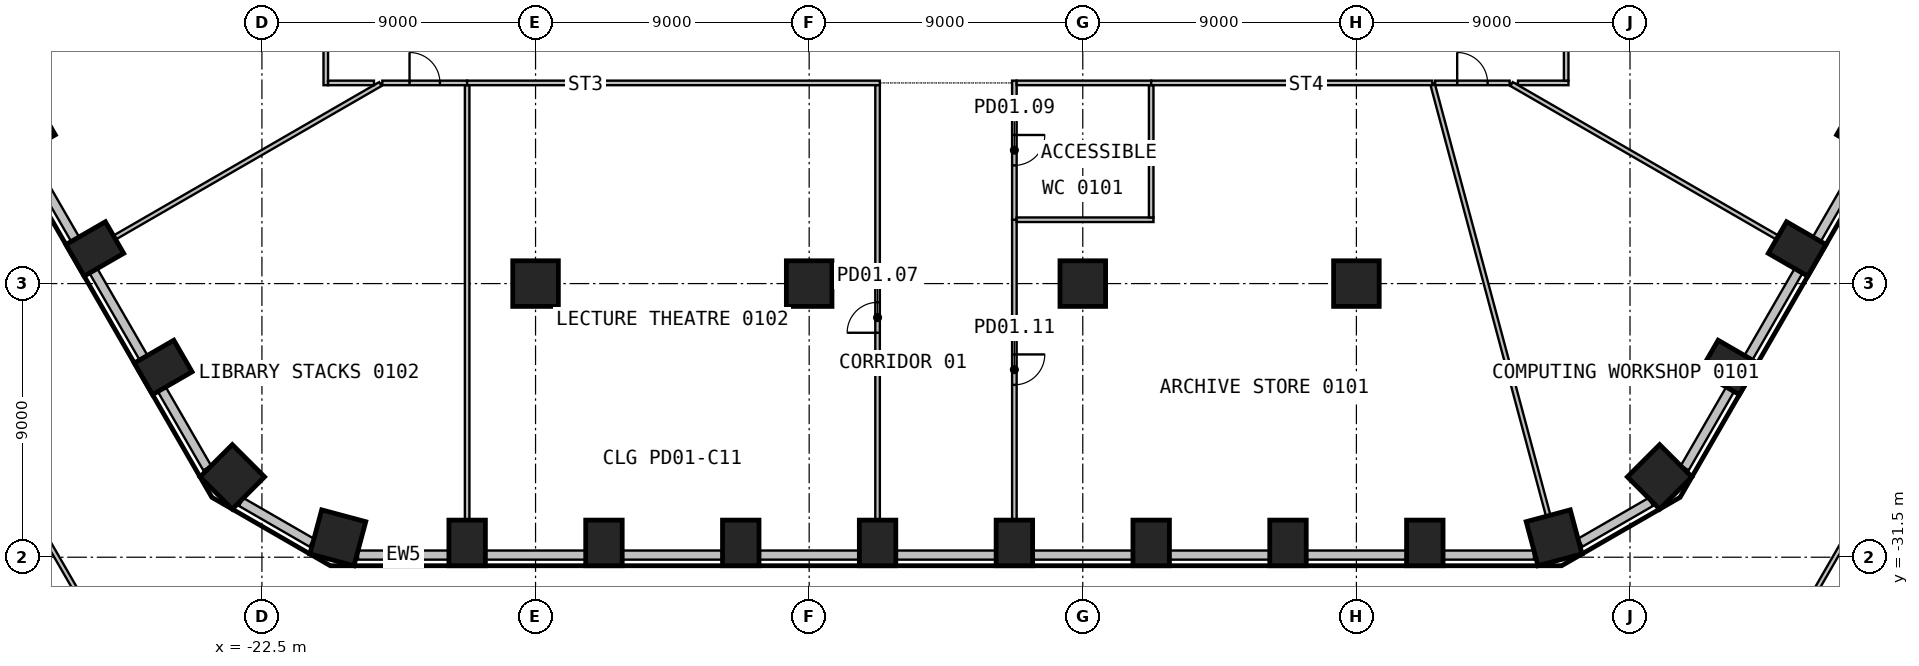
"""IFC4 building model, lengths in metres.
Left out: names, types, materials, properties, quantities, classifications, styles, units other than length and angle.
Written with IfcOpenShell. Run it as: python <this file> out.ifc"""

import sys

from ifc_helpers import new_model, si_unit, direction, frame, frame_2d, origin, origin_2d, place, context, subcontext, project, spatial, rectangle, circle, extrude, element, fill, save


model = new_model("IFC4")
c1 = context("Model", 3, precision=1e-05, world=origin(), true_north=direction((0.0, 1.0)))
c2 = subcontext(c1, "Body", "Model", "MODEL_VIEW")
j1 = project(units=[si_unit("LENGTHUNIT", "METRE"), si_unit("PLANEANGLEUNIT", "RADIAN")], contexts=[c1])
p1 = place(None, origin())
s1 = spatial("IfcSite", under=j1, at=p1, CompositionType="ELEMENT")
p2 = place(p1, origin())
s2 = spatial("IfcBuilding", under=s1, at=p2, CompositionType="ELEMENT")
p3 = place(p2, frame((0.0, 0.0, 6.0)))
s3 = spatial("IfcBuildingStorey", under=s2, at=p3, CompositionType="ELEMENT", Elevation=6.0)
p4 = place(p3, frame((-20.004, -30.861, 0.0), z_axis=(0.0, 0.0, 1.0), x_axis=(0.965925826289, -0.258819045103, 0.0)))
e1 = element("IfcColumn", 1, at=p4, inside=s3, PredefinedType="COLUMN", context=c2, shape_type="SweptSolid", body=[
    extrude(rectangle(XDim=1.5, YDim=1.5, at=origin_2d()), origin(), (0.0, 0.0, 1.0), 4.4),
])
for number, where, z_axis, x_axis in (
    (2, (-15.75, -31.03, 0.0), (0.0, 0.0, 1.0), (1.0, 0.0, 0.0)),
    (3, (-11.25, -31.03, 0.0), (0.0, 0.0, 1.0), (1.0, 0.0, 0.0)),
    (4, (-6.75, -31.03, 0.0), (0.0, 0.0, 1.0), (1.0, 0.0, 0.0)),
    (5, (-2.25, -31.03, 0.0), (0.0, 0.0, 1.0), (1.0, 0.0, 0.0)),
    (6, (2.25, -31.03, 0.0), (0.0, 0.0, 1.0), (1.0, 0.0, 0.0)),
    (7, (6.75, -31.03, 0.0), (0.0, 0.0, 1.0), (1.0, 0.0, 0.0)),
    (8, (11.25, -31.03, 0.0), (0.0, 0.0, 1.0), (1.0, 0.0, 0.0)),
    (9, (15.75, -31.03, 0.0), (0.0, 0.0, 1.0), (1.0, 0.0, 0.0)),
):
    element("IfcColumn", number, at=place(p3, frame(where, z_axis=z_axis, x_axis=x_axis)), inside=s3, PredefinedType="COLUMN", context=c2, shape_type="SweptSolid", body=[
        extrude(rectangle(XDim=1.2, YDim=1.5, at=origin_2d()), origin(), (0.0, 0.0, 1.0), 4.4),
    ])
for number, where, z_axis, x_axis in (
    (10, (20.004, -30.861, 0.0), (0.0, 0.0, 1.0), (0.966, 0.259, 0.0)),
    (11, (23.475, -28.857, 0.0), (0.0, 0.0, 1.0), (0.707, 0.707, 0.0)),
):
    element("IfcColumn", number, at=place(p3, frame(where, z_axis=z_axis, x_axis=x_axis)), inside=s3, PredefinedType="COLUMN", context=c2, shape_type="SweptSolid", body=[
        extrude(rectangle(XDim=1.5, YDim=1.5, at=origin_2d()), origin(), (0.0, 0.0, 1.0), 4.4),
    ])
for number, where, z_axis, x_axis in (
    (12, (25.748, -25.258, 0.0), (0.0, 0.0, 1.0), (0.5, 0.866, 0.0)),
    (13, (27.998, -21.361, 0.0), (0.0, 0.0, 1.0), (0.5, 0.866, 0.0)),
    (14, (30.248, -17.463, 0.0), (0.0, 0.0, 1.0), (0.5, 0.866, 0.0)),
    (15, (-30.248, -17.463, 0.0), (0.0, 0.0, 1.0), (0.5, -0.866, 0.0)),
    (16, (-27.998, -21.361, 0.0), (0.0, 0.0, 1.0), (0.5, -0.866, 0.0)),
    (17, (-25.748, -25.258, 0.0), (0.0, 0.0, 1.0), (0.5, -0.866, 0.0)),
):
    element("IfcColumn", number, at=place(p3, frame(where, z_axis=z_axis, x_axis=x_axis)), inside=s3, PredefinedType="COLUMN", context=c2, shape_type="SweptSolid", body=[
        extrude(rectangle(XDim=1.2, YDim=1.5, at=origin_2d()), origin(), (0.0, 0.0, 1.0), 4.4),
    ])
p5 = place(p3, frame((-23.475, -28.857, 0.0), z_axis=(0.0, 0.0, 1.0), x_axis=(0.707106781187, -0.707106781187, 0.0)))
e18 = element("IfcColumn", 18, at=p5, inside=s3, PredefinedType="COLUMN", context=c2, shape_type="SweptSolid", body=[
    extrude(rectangle(XDim=1.5, YDim=1.5, at=origin_2d()), origin(), (0.0, 0.0, 1.0), 4.4),
])
for number, where, z_axis, x_axis in (
    (19, (-13.5, -22.5, 0.0), (0.0, 0.0, 1.0), (1.0, 0.0, 0.0)),
    (20, (-4.5, -22.5, 0.0), (0.0, 0.0, 1.0), (1.0, 0.0, 0.0)),
    (21, (4.5, -22.5, 0.0), (0.0, 0.0, 1.0), (1.0, 0.0, 0.0)),
    (22, (13.5, -22.5, 0.0), (0.0, 0.0, 1.0), (1.0, 0.0, 0.0)),
):
    element("IfcColumn", number, at=place(p3, frame(where, z_axis=z_axis, x_axis=x_axis)), inside=s3, PredefinedType="COLUMN", context=c2, shape_type="SweptSolid", body=[
        extrude(circle(Radius=0.75, at=origin_2d()), origin(), (0.0, 0.0, 1.0), 4.4),
    ])
p6 = place(p3, frame((-19.339, -31.43, 0.0), z_axis=(0.0, 0.0, 1.0), x_axis=(1.0, 0.0, 0.0)))
e23 = element("IfcWall", 23, at=p6, inside=s3, PredefinedType="SOLIDWALL", context=c2, shape_type="SweptSolid", body=[
    extrude(rectangle(XDim=2.989, YDim=0.3, at=frame_2d((1.494, 0.0))), origin(), (0.0, 0.0, 1.0), 4.4),
])
for number, where, z_axis, x_axis in (
    (24, (-15.149, -31.43, 0.0), (0.0, 0.0, 1.0), (1.0, 0.0, 0.0)),
    (25, (-10.649, -31.43, 0.0), (0.0, 0.0, 1.0), (1.0, 0.0, 0.0)),
    (26, (-6.149, -31.43, 0.0), (0.0, 0.0, 1.0), (1.0, 0.0, 0.0)),
    (27, (-1.649, -31.43, 0.0), (0.0, 0.0, 1.0), (1.0, 0.0, 0.0)),
    (28, (2.851, -31.43, 0.0), (0.0, 0.0, 1.0), (1.0, 0.0, 0.0)),
    (29, (7.351, -31.43, 0.0), (0.0, 0.0, 1.0), (1.0, 0.0, 0.0)),
    (30, (11.851, -31.43, 0.0), (0.0, 0.0, 1.0), (1.0, 0.0, 0.0)),
):
    element("IfcWall", number, at=place(p3, frame(where, z_axis=z_axis, x_axis=x_axis)), inside=s3, PredefinedType="SOLIDWALL", context=c2, shape_type="SweptSolid", body=[
        extrude(rectangle(XDim=3.299, YDim=0.3, at=frame_2d((1.649, 0.0))), origin(), (0.0, 0.0, 1.0), 4.4),
    ])
p7 = place(p3, frame((16.351, -31.43, 0.0), z_axis=(0.0, 0.0, 1.0), x_axis=(1.0, 0.0, 0.0)))
e31 = element("IfcWall", 31, at=p7, inside=s3, PredefinedType="SOLIDWALL", context=c2, shape_type="SweptSolid", body=[
    extrude(rectangle(XDim=2.989, YDim=0.3, at=frame_2d((1.494, 0.0))), origin(), (0.0, 0.0, 1.0), 4.4),
])
p8 = place(p3, frame((20.864, -31.021, 0.0), z_axis=(0.0, 0.0, 1.0), x_axis=(0.866001915448, 0.500040680786, 0.0)))
e32 = element("IfcWall", 32, at=p8, inside=s3, PredefinedType="SOLIDWALL", context=c2, shape_type="SweptSolid", body=[
    extrude(rectangle(XDim=2.678, YDim=0.3, at=frame_2d((1.339, 0.0))), origin(), (0.0, 0.0, 1.0), 4.4),
])
p9 = place(p3, frame((24.299, -28.566, 0.0), z_axis=(0.0, 0.0, 1.0), x_axis=(0.49999586137, 0.866027793211, 0.0)))
e33 = element("IfcWall", 33, at=p9, inside=s3, PredefinedType="SOLIDWALL", context=c2, shape_type="SweptSolid", body=[
    extrude(rectangle(XDim=2.989, YDim=0.3, at=frame_2d((1.494, 0.0))), origin(), (0.0, 0.0, 1.0), 4.4),
])
for number, where, z_axis, x_axis in (
    (34, (26.394, -24.938, 0.0), (0.0, 0.0, 1.0), (0.5, 0.866, 0.0)),
    (35, (28.644, -21.041, 0.0), (0.0, 0.0, 1.0), (0.5, 0.866, 0.0)),
    (36, (-30.294, -18.184, 0.0), (0.0, 0.0, 1.0), (0.5, -0.866, 0.0)),
    (37, (-28.044, -22.081, 0.0), (0.0, 0.0, 1.0), (0.5, -0.866, 0.0)),
):
    element("IfcWall", number, at=place(p3, frame(where, z_axis=z_axis, x_axis=x_axis)), inside=s3, PredefinedType="SOLIDWALL", context=c2, shape_type="SweptSolid", body=[
        extrude(rectangle(XDim=3.299, YDim=0.3, at=frame_2d((1.649, 0.0))), origin(), (0.0, 0.0, 1.0), 4.4),
    ])
p10 = place(p3, frame((-25.794, -25.978, 0.0), z_axis=(0.0, 0.0, 1.0), x_axis=(0.49999586137, -0.866027793211, 0.0)))
e38 = element("IfcWall", 38, at=p10, inside=s3, PredefinedType="SOLIDWALL", context=c2, shape_type="SweptSolid", body=[
    extrude(rectangle(XDim=2.989, YDim=0.3, at=frame_2d((1.494, 0.0))), origin(), (0.0, 0.0, 1.0), 4.4),
])
p11 = place(p3, frame((-23.183, -29.682, 0.0), z_axis=(0.0, 0.0, 1.0), x_axis=(0.866001915448, -0.500040680786, 0.0)))
e39 = element("IfcWall", 39, at=p11, inside=s3, PredefinedType="SOLIDWALL", context=c2, shape_type="SweptSolid", body=[
    extrude(rectangle(XDim=2.678, YDim=0.3, at=frame_2d((1.339, 0.0))), origin(), (0.0, 0.0, 1.0), 4.4),
])
p12 = place(p3, frame((-28.062, -33.548, 0.0), z_axis=(0.0, 0.0, 1.0), x_axis=(-0.500064997195, 0.865987874384, 0.0)))
e40 = element("IfcWall", 40, at=p12, inside=s3, PredefinedType="PARTITIONING", context=c2, shape_type="SweptSolid", body=[
    extrude(rectangle(XDim=10.447, YDim=0.15, at=frame_2d((5.223, 0.0))), origin(), (0.0, 0.0, 1.0), 4.05),
])
p13 = place(p3, frame((33.362, -24.371, 0.0), z_axis=(0.0, 0.0, 1.0), x_axis=(-0.500054877109, -0.865993718152, 0.0)))
e41 = element("IfcWall", 41, at=p13, inside=s3, PredefinedType="PARTITIONING", context=c2, shape_type="SweptSolid", body=[
    extrude(rectangle(XDim=10.447, YDim=0.15, at=frame_2d((5.224, 0.0))), origin(), (0.0, 0.0, 1.0), 4.05),
])
p14 = place(p3, frame((-18.605, -15.938, 0.0), z_axis=(0.0, 0.0, 1.0), x_axis=(-0.865988664976, -0.500063628085, 0.0)))
e42 = element("IfcWall", 42, at=p14, inside=s3, PredefinedType="PARTITIONING", context=c2, shape_type="SweptSolid", body=[
    extrude(rectangle(XDim=10.076, YDim=0.15, at=frame_2d((5.038, 0.0))), origin(), (0.0, 0.0, 1.0), 4.4),
])
p15 = place(p3, frame((-20.4, -2.325, 0.0), z_axis=(0.0, 0.0, 1.0), x_axis=(0.0, -1.0, 0.0)))
e43 = element("IfcWall", 43, at=p15, inside=s3, PredefinedType="PARTITIONING", context=c2, shape_type="SweptSolid", body=[
    extrude(rectangle(XDim=13.65, YDim=0.15, at=frame_2d((6.825, 0.0))), origin(), (0.0, 0.0, 1.0), 4.4),
])
p16 = place(p15, frame((6.325, 0.0, 0.0)))
e44 = element("IfcOpeningElement", 44, at=p16, cuts=e43, PredefinedType="OPENING", context=c2, shape_type="SweptSolid", body=[
    extrude(rectangle(XDim=1.0, YDim=2.1, at=frame_2d((0.5, 1.05))), frame((0.0, 0.085, 0.0), z_axis=(0.0, -1.0, 0.0), x_axis=(1.0, 0.0, 0.0)), (0.0, 0.0, 1.0), 0.17),
])
p17 = place(p3, frame((-20.325, -15.9, 0.0), z_axis=(0.0, 0.0, 1.0), x_axis=(1.0, 0.0, 0.0)))
e45 = element("IfcWall", 45, at=p17, inside=s3, PredefinedType="PARTITIONING", context=c2, shape_type="SweptSolid", body=[
    extrude(rectangle(XDim=1.51, YDim=0.15, at=frame_2d((0.755, 0.0))), origin(), (0.0, 0.0, 1.0), 4.4),
])
p18 = place(p3, frame((-18.54, -15.9, 0.0), z_axis=(0.0, 0.0, 1.0), x_axis=(1.0, 0.0, 0.0)))
e46 = element("IfcWall", 46, at=p18, inside=s3, PredefinedType="PARTITIONING", context=c2, shape_type="SweptSolid", body=[
    extrude(rectangle(XDim=2.79, YDim=0.15, at=frame_2d((1.395, 0.0))), origin(), (0.0, 0.0, 1.0), 4.4),
])
p19 = place(p18, frame((0.895, 0.0, 0.0)))
e47 = element("IfcOpeningElement", 47, at=p19, cuts=e46, PredefinedType="OPENING", context=c2, shape_type="SweptSolid", body=[
    extrude(rectangle(XDim=1.0, YDim=2.1, at=frame_2d((0.5, 1.05))), frame((0.0, 0.085, 0.0), z_axis=(0.0, -1.0, 0.0), x_axis=(1.0, 0.0, 0.0)), (0.0, 0.0, 1.0), 0.17),
])
p20 = place(p3, frame((-15.75, -15.975, 0.0), z_axis=(0.0, 0.0, 1.0), x_axis=(0.0, -1.0, 0.0)))
e48 = element("IfcWall", 48, at=p20, inside=s3, PredefinedType="PARTITIONING", context=c2, shape_type="SweptSolid", body=[
    extrude(rectangle(XDim=14.285, YDim=0.15, at=frame_2d((7.142, 0.0))), origin(), (0.0, 0.0, 1.0), 4.4),
])
p21 = place(p3, frame((-15.75, -15.9, 0.0), z_axis=(0.0, 0.0, 1.0), x_axis=(1.0, 0.0, 0.0)))
e49 = element("IfcWall", 49, at=p21, inside=s3, PredefinedType="PARTITIONING", context=c2, shape_type="SweptSolid", body=[
    extrude(rectangle(XDim=13.575, YDim=0.15, at=frame_2d((6.788, 0.0))), origin(), (0.0, 0.0, 1.0), 4.4),
])
p22 = place(p3, frame((-2.25, -30.26, 0.0), z_axis=(0.0, 0.0, 1.0), x_axis=(0.0, 1.0, 0.0)))
e50 = element("IfcWall", 50, at=p22, inside=s3, PredefinedType="PARTITIONING", context=c2, shape_type="SweptSolid", body=[
    extrude(rectangle(XDim=14.285, YDim=0.15, at=frame_2d((7.142, 0.0))), origin(), (0.0, 0.0, 1.0), 4.4),
])
p23 = place(p22, frame((6.142, 0.0, 0.0)))
e51 = element("IfcOpeningElement", 51, at=p23, cuts=e50, PredefinedType="OPENING", context=c2, shape_type="SweptSolid", body=[
    extrude(rectangle(XDim=1.0, YDim=2.1, at=frame_2d((0.5, 1.05))), frame((0.0, 0.085, 0.0), z_axis=(0.0, -1.0, 0.0), x_axis=(1.0, 0.0, 0.0)), (0.0, 0.0, 1.0), 0.17),
])
p24 = place(p3, frame((2.25, -20.4, 0.0), z_axis=(0.0, 0.0, 1.0), x_axis=(0.0, -1.0, 0.0)))
e52 = element("IfcWall", 52, at=p24, inside=s3, PredefinedType="PARTITIONING", context=c2, shape_type="SweptSolid", body=[
    extrude(rectangle(XDim=9.86, YDim=0.15, at=frame_2d((4.93, 0.0))), origin(), (0.0, 0.0, 1.0), 4.4),
])
p25 = place(p24, frame((4.43, 0.0, 0.0)))
e53 = element("IfcOpeningElement", 53, at=p25, cuts=e52, PredefinedType="OPENING", context=c2, shape_type="SweptSolid", body=[
    extrude(rectangle(XDim=1.0, YDim=2.1, at=frame_2d((0.5, 1.05))), frame((0.0, 0.085, 0.0), z_axis=(0.0, -1.0, 0.0), x_axis=(1.0, 0.0, 0.0)), (0.0, 0.0, 1.0), 0.17),
])
p26 = place(p3, frame((2.25, -15.825, 0.0), z_axis=(0.0, 0.0, 1.0), x_axis=(0.0, -1.0, 0.0)))
e54 = element("IfcWall", 54, at=p26, inside=s3, PredefinedType="PARTITIONING", context=c2, shape_type="SweptSolid", body=[
    extrude(rectangle(XDim=4.575, YDim=0.15, at=frame_2d((2.288, 0.0))), origin(), (0.0, 0.0, 1.0), 4.4),
])
p27 = place(p26, frame((1.788, 0.0, 0.0)))
e55 = element("IfcOpeningElement", 55, at=p27, cuts=e54, PredefinedType="OPENING", context=c2, shape_type="SweptSolid", body=[
    extrude(rectangle(XDim=1.0, YDim=2.1, at=frame_2d((0.5, 1.05))), frame((0.0, 0.085, 0.0), z_axis=(0.0, -1.0, 0.0), x_axis=(1.0, 0.0, 0.0)), (0.0, 0.0, 1.0), 0.17),
])
p28 = place(p3, frame((6.825, -20.4, 0.0), z_axis=(0.0, 0.0, 1.0), x_axis=(-1.0, 0.0, 0.0)))
e56 = element("IfcWall", 56, at=p28, inside=s3, PredefinedType="PARTITIONING", context=c2, shape_type="SweptSolid", body=[
    extrude(rectangle(XDim=4.5, YDim=0.15, at=frame_2d((2.25, 0.0))), origin(), (0.0, 0.0, 1.0), 4.4),
])
p29 = place(p3, frame((2.325, -15.9, 0.0), z_axis=(0.0, 0.0, 1.0), x_axis=(1.0, 0.0, 0.0)))
e57 = element("IfcWall", 57, at=p29, inside=s3, PredefinedType="PARTITIONING", context=c2, shape_type="SweptSolid", body=[
    extrude(rectangle(XDim=4.425, YDim=0.15, at=frame_2d((2.212, 0.0))), origin(), (0.0, 0.0, 1.0), 4.4),
])
p30 = place(p3, frame((6.75, -15.975, 0.0), z_axis=(0.0, 0.0, 1.0), x_axis=(0.0, -1.0, 0.0)))
e58 = element("IfcWall", 58, at=p30, inside=s3, PredefinedType="PARTITIONING", context=c2, shape_type="SweptSolid", body=[
    extrude(rectangle(XDim=4.35, YDim=0.15, at=frame_2d((2.175, 0.0))), origin(), (0.0, 0.0, 1.0), 4.4),
])
p31 = place(p3, frame((6.75, -15.9, 0.0), z_axis=(0.0, 0.0, 1.0), x_axis=(1.0, 0.0, 0.0)))
e59 = element("IfcWall", 59, at=p31, inside=s3, PredefinedType="PARTITIONING", context=c2, shape_type="SweptSolid", body=[
    extrude(rectangle(XDim=9.245, YDim=0.15, at=frame_2d((4.623, 0.0))), origin(), (0.0, 0.0, 1.0), 4.4),
])
p32 = place(p3, frame((16.09, -15.9, 0.0), z_axis=(0.0, 0.0, 1.0), x_axis=(1.0, 0.0, 0.0)))
e60 = element("IfcWall", 60, at=p32, inside=s3, PredefinedType="PARTITIONING", context=c2, shape_type="SweptSolid", body=[
    extrude(rectangle(XDim=2.45, YDim=0.15, at=frame_2d((1.225, 0.0))), origin(), (0.0, 0.0, 1.0), 4.4),
])
p33 = place(p32, frame((0.725, 0.0, 0.0)))
e61 = element("IfcOpeningElement", 61, at=p33, cuts=e60, PredefinedType="OPENING", context=c2, shape_type="SweptSolid", body=[
    extrude(rectangle(XDim=1.0, YDim=2.1, at=frame_2d((0.5, 1.05))), frame((0.0, 0.085, 0.0), z_axis=(0.0, -1.0, 0.0), x_axis=(1.0, 0.0, 0.0)), (0.0, 0.0, 1.0), 0.17),
])
p34 = place(p3, frame((16.014, -15.972, 0.0), z_axis=(0.0, 0.0, 1.0), x_axis=(0.258843305697, -0.965919325356, 0.0)))
e62 = element("IfcWall", 62, at=p34, inside=s3, PredefinedType="PARTITIONING", context=c2, shape_type="SweptSolid", body=[
    extrude(rectangle(XDim=14.644, YDim=0.15, at=frame_2d((7.322, 0.0))), origin(), (0.0, 0.0, 1.0), 4.4),
])
p35 = place(p3, frame((18.815, -15.9, 0.0), z_axis=(0.0, 0.0, 1.0), x_axis=(1.0, 0.0, 0.0)))
e63 = element("IfcWall", 63, at=p35, inside=s3, PredefinedType="PARTITIONING", context=c2, shape_type="SweptSolid", body=[
    extrude(rectangle(XDim=1.66, YDim=0.15, at=frame_2d((0.83, 0.0))), origin(), (0.0, 0.0, 1.0), 4.4),
])
p36 = place(p3, frame((18.605, -15.938, 0.0), z_axis=(0.0, 0.0, 1.0), x_axis=(0.865988664976, -0.500063628085, 0.0)))
e64 = element("IfcWall", 64, at=p36, inside=s3, PredefinedType="PARTITIONING", context=c2, shape_type="SweptSolid", body=[
    extrude(rectangle(XDim=10.076, YDim=0.15, at=frame_2d((5.038, 0.0))), origin(), (0.0, 0.0, 1.0), 4.4),
])
p37 = place(p3, frame((20.4, -15.825, 0.0), z_axis=(0.0, 0.0, 1.0), x_axis=(0.0, 1.0, 0.0)))
e65 = element("IfcWall", 65, at=p37, inside=s3, PredefinedType="PARTITIONING", context=c2, shape_type="SweptSolid", body=[
    extrude(rectangle(XDim=13.65, YDim=0.15, at=frame_2d((6.825, 0.0))), origin(), (0.0, 0.0, 1.0), 4.4),
])
p38 = place(p37, frame((6.325, 0.0, 0.0)))
e66 = element("IfcOpeningElement", 66, at=p38, cuts=e65, PredefinedType="OPENING", context=c2, shape_type="SweptSolid", body=[
    extrude(rectangle(XDim=1.0, YDim=2.1, at=frame_2d((0.5, 1.05))), frame((0.0, 0.085, 0.0), z_axis=(0.0, -1.0, 0.0), x_axis=(1.0, 0.0, 0.0)), (0.0, 0.0, 1.0), 0.17),
])
p39 = place(p19, origin())
e67 = element("IfcDoor", 67, at=p39, inside=s3, OperationType="SINGLE_SWING_LEFT", PredefinedType="DOOR", context=c2, shape_type="SweptSolid", body=[
    extrude(rectangle(XDim=1.0, YDim=2.1, at=frame_2d((0.5, 1.05))), frame((0.0, 0.025, 0.0), z_axis=(0.0, -1.0, 0.0), x_axis=(1.0, 0.0, 0.0)), (0.0, 0.0, 1.0), 0.05),
])
fill(e47, e67)
p40 = place(p23, origin())
e68 = element("IfcDoor", 68, at=p40, inside=s3, OperationType="SINGLE_SWING_RIGHT", PredefinedType="DOOR", context=c2, shape_type="SweptSolid", body=[
    extrude(rectangle(XDim=1.0, YDim=2.1, at=frame_2d((0.5, 1.05))), frame((0.0, 0.025, 0.0), z_axis=(0.0, -1.0, 0.0), x_axis=(1.0, 0.0, 0.0)), (0.0, 0.0, 1.0), 0.05),
])
fill(e51, e68)
p41 = place(p27, origin())
e69 = element("IfcDoor", 69, at=p41, inside=s3, OperationType="SINGLE_SWING_RIGHT", PredefinedType="DOOR", context=c2, shape_type="SweptSolid", body=[
    extrude(rectangle(XDim=1.0, YDim=2.1, at=frame_2d((0.5, 1.05))), frame((0.0, 0.025, 0.0), z_axis=(0.0, -1.0, 0.0), x_axis=(1.0, 0.0, 0.0)), (0.0, 0.0, 1.0), 0.05),
])
fill(e55, e69)
p42 = place(p25, origin())
e70 = element("IfcDoor", 70, at=p42, inside=s3, OperationType="SINGLE_SWING_RIGHT", PredefinedType="DOOR", context=c2, shape_type="SweptSolid", body=[
    extrude(rectangle(XDim=1.0, YDim=2.1, at=frame_2d((0.5, 1.05))), frame((0.0, 0.025, 0.0), z_axis=(0.0, -1.0, 0.0), x_axis=(1.0, 0.0, 0.0)), (0.0, 0.0, 1.0), 0.05),
])
fill(e53, e70)
p43 = place(p33, origin())
e71 = element("IfcDoor", 71, at=p43, inside=s3, OperationType="SINGLE_SWING_LEFT", PredefinedType="DOOR", context=c2, shape_type="SweptSolid", body=[
    extrude(rectangle(XDim=1.0, YDim=2.1, at=frame_2d((0.5, 1.05))), frame((0.0, 0.025, 0.0), z_axis=(0.0, -1.0, 0.0), x_axis=(1.0, 0.0, 0.0)), (0.0, 0.0, 1.0), 0.05),
])
fill(e61, e71)
save(model, sys.argv[1])
